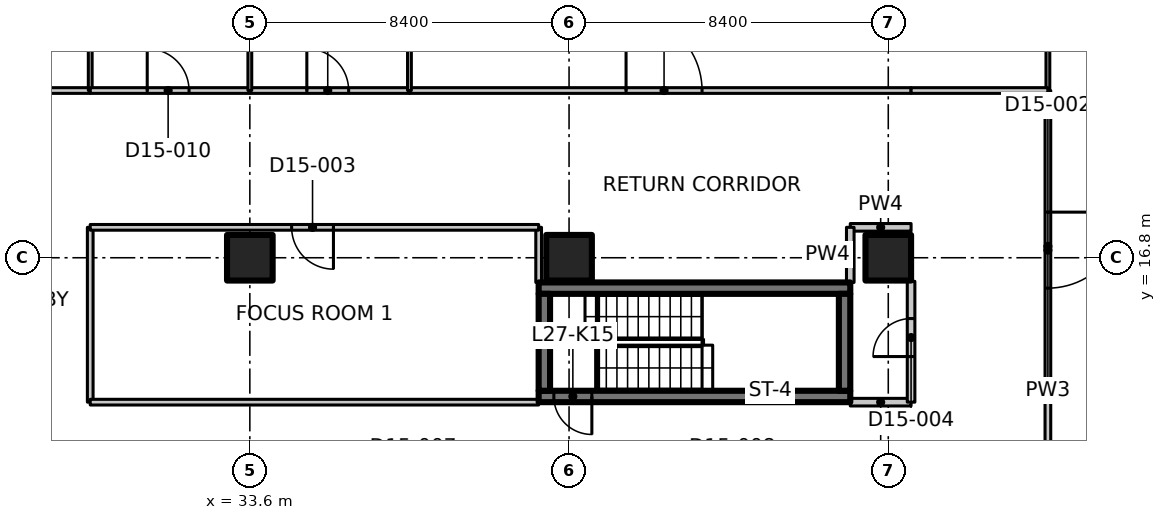
"""IFC4 building model, lengths in metres.
Left out: names, types, materials, properties, quantities, classifications, styles, units other than length and angle.
Written with IfcOpenShell. Run it as: python <this file> out.ifc"""

import sys

from ifc_helpers import new_model, si_unit, direction, frame, frame_2d, origin, origin_2d, place, context, subcontext, project, spatial, polyline, rectangle, outline, extrude, element, fill, save


model = new_model("IFC4")
c1 = context("Model", 3, precision=1e-05, world=origin(), true_north=direction((0.0, 1.0)))
c2 = subcontext(c1, "Body", "Model", "MODEL_VIEW")
j1 = project(units=[si_unit("LENGTHUNIT", "METRE"), si_unit("PLANEANGLEUNIT", "RADIAN")], contexts=[c1])
p1 = place(None, origin())
s1 = spatial("IfcSite", under=j1, at=p1, CompositionType="ELEMENT")
p2 = place(p1, origin())
s2 = spatial("IfcBuilding", under=s1, at=p2, CompositionType="ELEMENT")
p3 = place(p2, frame((0.0, 0.0, 113.3)))
s3 = spatial("IfcBuildingStorey", under=s2, at=p3, CompositionType="ELEMENT", Elevation=113.3)
for number, where, z_axis, x_axis in (
    (1, (33.6, 16.8, 0.0), (0.0, 0.0, 1.0), (1.0, 0.0, 0.0)),
    (2, (42.0, 16.8, 0.0), (0.0, 0.0, 1.0), (1.0, 0.0, 0.0)),
    (3, (50.4, 16.8, 0.0), (0.0, 0.0, 1.0), (1.0, 0.0, 0.0)),
):
    element("IfcColumn", number, at=place(p3, frame(where, z_axis=z_axis, x_axis=x_axis)), inside=s3, PredefinedType="COLUMN", context=c2, shape_type="SweptSolid", body=[
        extrude(rectangle(XDim=1.2, YDim=1.2, at=origin_2d()), origin(), (0.0, 0.0, 1.0), 3.35),
    ])
p4 = place(p3, frame((49.4, 13.15, 0.0), z_axis=(0.0, 0.0, 1.0), x_axis=(-1.0, 0.0, 0.0)))
e4 = element("IfcWall", 4, at=p4, inside=s3, PredefinedType="SHEAR", context=c2, shape_type="SweptSolid", body=[
    extrude(rectangle(XDim=8.2, YDim=0.3, at=frame_2d((4.1, 0.0))), origin(), (0.0, 0.0, 1.0), 3.35),
])
p5 = place(p4, frame((6.8, 0.0, 0.0)))
e5 = element("IfcOpeningElement", 5, at=p5, cuts=e4, PredefinedType="OPENING", context=c2, shape_type="SweptSolid", body=[
    extrude(rectangle(XDim=1.0, YDim=2.1, at=frame_2d((0.5, 1.05))), frame((0.0, 0.16, 0.0), z_axis=(0.0, -1.0, 0.0), x_axis=(1.0, 0.0, 0.0)), (0.0, 0.0, 1.0), 0.32),
])
p6 = place(p3, frame((41.2, 16.0, 0.0), z_axis=(0.0, 0.0, 1.0), x_axis=(1.0, 0.0, 0.0)))
e6 = element("IfcWall", 6, at=p6, inside=s3, PredefinedType="SHEAR", context=c2, shape_type="SweptSolid", body=[
    extrude(rectangle(XDim=8.2, YDim=0.3, at=frame_2d((4.1, 0.0))), origin(), (0.0, 0.0, 1.0), 3.35),
])
for number, where, z_axis, x_axis in (
    (7, (41.35, 13.3, 0.0), (0.0, 0.0, 1.0), (0.0, 1.0, 0.0)),
    (8, (49.25, 13.3, 0.0), (0.0, 0.0, 1.0), (0.0, 1.0, 0.0)),
):
    element("IfcWall", number, at=place(p3, frame(where, z_axis=z_axis, x_axis=x_axis)), inside=s3, PredefinedType="SHEAR", context=c2, shape_type="SweptSolid", body=[
        extrude(rectangle(XDim=2.55, YDim=0.3, at=frame_2d((1.275, 0.0))), origin(), (0.0, 0.0, 1.0), 3.35),
    ])
p7 = place(p3, frame((25.2, 21.2, 0.0), z_axis=(0.0, 0.0, 1.0), x_axis=(1.0, 0.0, 0.0)))
e9 = element("IfcWall", 9, at=p7, inside=s3, PredefinedType="PARTITIONING", context=c2, shape_type="SweptSolid", body=[
    extrude(rectangle(XDim=4.2, YDim=0.15, at=frame_2d((2.1, 0.0))), origin(), (0.0, 0.0, 1.0), 3.33),
])
p8 = place(p3, frame((29.4, 17.6, 0.0), z_axis=(0.0, 0.0, 1.0), x_axis=(0.0, -1.0, 0.0)))
e10 = element("IfcWall", 10, at=p8, inside=s3, PredefinedType="PARTITIONING", context=c2, shape_type="SweptSolid", body=[
    extrude(rectangle(XDim=4.6, YDim=0.15, at=frame_2d((2.3, 0.0))), origin(), (0.0, 0.0, 1.0), 3.33),
])
p9 = place(p3, frame((29.4, 27.511, 0.0), z_axis=(0.0, 0.0, 1.0), x_axis=(0.0, -1.0, 0.0)))
e11 = element("IfcWall", 11, at=p9, inside=s3, PredefinedType="PARTITIONING", context=c2, shape_type="SweptSolid", body=[
    extrude(outline(polyline([(0.0, 0.0), (6.311, 0.0), (6.311, 3.33), (2.761, 3.33), (2.759, 2.98), (1.863, 2.98), (1.861, 3.33), (0.236, 3.33), (0.0, 3.33), (0.0, 0.0)])), frame((0.0, 0.05, 0.0), z_axis=(0.0, -1.0, 0.0), x_axis=(1.0, 0.0, 0.0)), (0.0, 0.0, 1.0), 0.1),
])
p10 = place(p3, frame((54.6, 13.0, 0.0), z_axis=(0.0, 0.0, 1.0), x_axis=(0.0, -1.0, 0.0)))
e12 = element("IfcWall", 12, at=p10, inside=s3, PredefinedType="PARTITIONING", context=c2, shape_type="SweptSolid", body=[
    extrude(rectangle(XDim=3.4, YDim=0.15, at=frame_2d((1.7, 0.0))), origin(), (0.0, 0.0, 1.0), 3.33),
])
p11 = place(p3, frame((29.4, 13.0, 0.0), z_axis=(0.0, 0.0, 1.0), x_axis=(1.0, 0.0, 0.0)))
e13 = element("IfcWall", 13, at=p11, inside=s3, PredefinedType="PARTITIONING", context=c2, shape_type="SweptSolid", body=[
    extrude(rectangle(XDim=11.8, YDim=0.15, at=frame_2d((5.9, 0.0))), origin(), (0.0, 0.0, 1.0), 3.33),
])
p12 = place(p3, frame((49.4, 13.0, 0.0), z_axis=(0.0, 0.0, 1.0), x_axis=(1.0, 0.0, 0.0)))
e14 = element("IfcWall", 14, at=p12, inside=s3, PredefinedType="PARTITIONING", context=c2, shape_type="SweptSolid", body=[
    extrude(rectangle(XDim=1.6, YDim=0.2, at=frame_2d((0.8, 0.0))), origin(), (0.0, 0.0, 1.0), 3.33),
])
p13 = place(p3, frame((54.6, 21.2, 0.0), z_axis=(0.0, 0.0, 1.0), x_axis=(0.0, -1.0, 0.0)))
e15 = element("IfcWall", 15, at=p13, inside=s3, PredefinedType="PARTITIONING", context=c2, shape_type="SweptSolid", body=[
    extrude(rectangle(XDim=8.2, YDim=0.15, at=frame_2d((4.1, 0.0))), origin(), (0.0, 0.0, 1.0), 3.33),
])
p14 = place(p13, frame((3.2, 0.0, 0.0)))
e16 = element("IfcOpeningElement", 16, at=p14, cuts=e15, PredefinedType="OPENING", context=c2, shape_type="SweptSolid", body=[
    extrude(rectangle(XDim=2.0, YDim=2.4, at=frame_2d((1.0, 1.2))), frame((0.0, 0.085, 0.0), z_axis=(0.0, -1.0, 0.0), x_axis=(1.0, 0.0, 0.0)), (0.0, 0.0, 1.0), 0.17),
])
p15 = place(p3, frame((54.6, 21.2, 0.0), z_axis=(0.0, 0.0, 1.0), x_axis=(0.0, 1.0, 0.0)))
e17 = element("IfcWall", 17, at=p15, inside=s3, PredefinedType="PARTITIONING", context=c2, shape_type="SweptSolid", body=[
    extrude(outline(polyline([(0.0, 0.0), (5.365, 0.0), (5.365, 3.33), (5.1, 3.33), (4.45, 3.33), (4.448, 2.98), (3.552, 2.98), (3.55, 3.33), (0.0, 3.33), (0.0, 0.0)])), frame((0.0, 0.05, 0.0), z_axis=(0.0, -1.0, 0.0), x_axis=(1.0, 0.0, 0.0)), (0.0, 0.0, 1.0), 0.1),
])
p16 = place(p3, frame((41.2, 16.15, 0.0), z_axis=(0.0, 0.0, 1.0), x_axis=(0.0, 1.0, 0.0)))
e18 = element("IfcWall", 18, at=p16, inside=s3, PredefinedType="PARTITIONING", context=c2, shape_type="SweptSolid", body=[
    extrude(rectangle(XDim=1.45, YDim=0.15, at=frame_2d((0.725, 0.0))), origin(), (0.0, 0.0, 1.0), 3.33),
])
p17 = place(p3, frame((41.2, 17.6, 0.0), z_axis=(0.0, 0.0, 1.0), x_axis=(-1.0, 0.0, 0.0)))
e19 = element("IfcWall", 19, at=p17, inside=s3, PredefinedType="PARTITIONING", context=c2, shape_type="SweptSolid", body=[
    extrude(rectangle(XDim=11.8, YDim=0.15, at=frame_2d((5.9, 0.0))), origin(), (0.0, 0.0, 1.0), 3.33),
])
p18 = place(p17, frame((5.4, 0.0, 0.0)))
e20 = element("IfcOpeningElement", 20, at=p18, cuts=e19, PredefinedType="OPENING", context=c2, shape_type="SweptSolid", body=[
    extrude(rectangle(XDim=1.1, YDim=2.1, at=frame_2d((0.55, 1.05))), frame((0.0, 0.085, 0.0), z_axis=(0.0, -1.0, 0.0), x_axis=(1.0, 0.0, 0.0)), (0.0, 0.0, 1.0), 0.17),
])
p19 = place(p3, frame((51.0, 17.6, 0.0), z_axis=(0.0, 0.0, 1.0), x_axis=(-1.0, 0.0, 0.0)))
e21 = element("IfcWall", 21, at=p19, inside=s3, PredefinedType="PARTITIONING", context=c2, shape_type="SweptSolid", body=[
    extrude(rectangle(XDim=1.6, YDim=0.2, at=frame_2d((0.8, 0.0))), origin(), (0.0, 0.0, 1.0), 3.33),
])
p20 = place(p3, frame((49.4, 17.6, 0.0), z_axis=(0.0, 0.0, 1.0), x_axis=(0.0, -1.0, 0.0)))
e22 = element("IfcWall", 22, at=p20, inside=s3, PredefinedType="PARTITIONING", context=c2, shape_type="SweptSolid", body=[
    extrude(rectangle(XDim=1.45, YDim=0.2, at=frame_2d((0.725, 0.0))), origin(), (0.0, 0.0, 1.0), 3.33),
])
p21 = place(p3, frame((29.4, 21.2, 0.0), z_axis=(0.0, 0.0, 1.0), x_axis=(1.0, 0.0, 0.0)))
e23 = element("IfcWall", 23, at=p21, inside=s3, PredefinedType="PARTITIONING", context=c2, shape_type="SweptSolid", body=[
    extrude(rectangle(XDim=4.2, YDim=0.15, at=frame_2d((2.1, 0.0))), origin(), (0.0, 0.0, 1.0), 3.33),
])
p22 = place(p21, frame((1.5, 0.0, 0.0)))
e24 = element("IfcOpeningElement", 24, at=p22, cuts=e23, PredefinedType="OPENING", context=c2, shape_type="SweptSolid", body=[
    extrude(rectangle(XDim=1.1, YDim=2.1, at=frame_2d((0.55, 1.05))), frame((0.0, 0.085, 0.0), z_axis=(0.0, -1.0, 0.0), x_axis=(1.0, 0.0, 0.0)), (0.0, 0.0, 1.0), 0.17),
])
p23 = place(p3, frame((33.6, 21.2, 0.0), z_axis=(0.0, 0.0, 1.0), x_axis=(1.0, 0.0, 0.0)))
e25 = element("IfcWall", 25, at=p23, inside=s3, PredefinedType="PARTITIONING", context=c2, shape_type="SweptSolid", body=[
    extrude(rectangle(XDim=4.2, YDim=0.15, at=frame_2d((2.1, 0.0))), origin(), (0.0, 0.0, 1.0), 3.33),
])
p24 = place(p23, frame((1.5, 0.0, 0.0)))
e26 = element("IfcOpeningElement", 26, at=p24, cuts=e25, PredefinedType="OPENING", context=c2, shape_type="SweptSolid", body=[
    extrude(rectangle(XDim=1.1, YDim=2.1, at=frame_2d((0.55, 1.05))), frame((0.0, 0.085, 0.0), z_axis=(0.0, -1.0, 0.0), x_axis=(1.0, 0.0, 0.0)), (0.0, 0.0, 1.0), 0.17),
])
p25 = place(p3, frame((37.8, 21.2, 0.0), z_axis=(0.0, 0.0, 1.0), x_axis=(1.0, 0.0, 0.0)))
e27 = element("IfcWall", 27, at=p25, inside=s3, PredefinedType="PARTITIONING", context=c2, shape_type="SweptSolid", body=[
    extrude(rectangle(XDim=13.2, YDim=0.15, at=frame_2d((6.6, 0.0))), origin(), (0.0, 0.0, 1.0), 3.33),
])
p26 = place(p25, frame((5.7, 0.0, 0.0)))
e28 = element("IfcOpeningElement", 28, at=p26, cuts=e27, PredefinedType="OPENING", context=c2, shape_type="SweptSolid", body=[
    extrude(rectangle(XDim=2.0, YDim=2.4, at=frame_2d((1.0, 1.2))), frame((0.0, 0.085, 0.0), z_axis=(0.0, -1.0, 0.0), x_axis=(1.0, 0.0, 0.0)), (0.0, 0.0, 1.0), 0.17),
])
p27 = place(p3, frame((51.0, 13.0, 0.0), z_axis=(0.0, 0.0, 1.0), x_axis=(0.0, 1.0, 0.0)))
e29 = element("IfcWall", 29, at=p27, inside=s3, PredefinedType="PARTITIONING", context=c2, shape_type="SweptSolid", body=[
    extrude(rectangle(XDim=3.18, YDim=0.2, at=frame_2d((1.59, 0.0))), origin(), (0.0, 0.0, 1.0), 3.33),
])
p28 = place(p27, frame((1.2, 0.0, 0.0)))
e30 = element("IfcOpeningElement", 30, at=p28, cuts=e29, PredefinedType="OPENING", context=c2, shape_type="SweptSolid", body=[
    extrude(rectangle(XDim=1.0, YDim=2.1, at=frame_2d((0.5, 1.05))), frame((0.0, 0.11, 0.0), z_axis=(0.0, -1.0, 0.0), x_axis=(1.0, 0.0, 0.0)), (0.0, 0.0, 1.0), 0.22),
])
p29 = place(p3, frame((51.0, 21.2, 0.0), z_axis=(0.0, 0.0, 1.0), x_axis=(1.0, 0.0, 0.0)))
e31 = element("IfcWall", 31, at=p29, inside=s3, PredefinedType="PARTITIONING", context=c2, shape_type="SweptSolid", body=[
    extrude(rectangle(XDim=3.6, YDim=0.15, at=frame_2d((1.8, 0.0))), origin(), (0.0, 0.0, 1.0), 3.33),
])
p30 = place(p3, frame((33.6, 24.68, 0.0), z_axis=(0.0, 0.0, 1.0), x_axis=(0.0, -1.0, 0.0)))
e32 = element("IfcWall", 32, at=p30, inside=s3, PredefinedType="PARTITIONING", context=c2, shape_type="SweptSolid", body=[
    extrude(rectangle(XDim=3.48, YDim=0.1, at=frame_2d((1.74, 0.0))), origin(), (0.0, 0.0, 1.0), 3.33),
])
p31 = place(p3, frame((37.8, 30.526, 0.0), z_axis=(0.0, 0.0, 1.0), x_axis=(0.0, -1.0, 0.0)))
e33 = element("IfcWall", 33, at=p31, inside=s3, PredefinedType="PARTITIONING", context=c2, shape_type="SweptSolid", body=[
    extrude(outline(polyline([(0.0, 0.0), (9.326, 0.0), (9.326, 3.33), (5.776, 3.33), (5.774, 2.98), (4.878, 2.98), (4.876, 3.33), (0.283, 3.33), (0.0, 3.33), (0.0, 0.0)])), frame((0.0, 0.05, 0.0), z_axis=(0.0, -1.0, 0.0), x_axis=(1.0, 0.0, 0.0)), (0.0, 0.0, 1.0), 0.1),
])
p32 = place(p5, origin())
e34 = element("IfcDoor", 34, at=p32, inside=s3, OperationType="SINGLE_SWING_RIGHT", PredefinedType="DOOR", context=c2, shape_type="SweptSolid", body=[
    extrude(rectangle(XDim=1.0, YDim=2.1, at=frame_2d((0.5, 1.05))), frame((0.0, 0.025, 0.0), z_axis=(0.0, -1.0, 0.0), x_axis=(1.0, 0.0, 0.0)), (0.0, 0.0, 1.0), 0.05),
])
fill(e5, e34)
p33 = place(p14, origin())
e35 = element("IfcDoor", 35, at=p33, inside=s3, OperationType="DOUBLE_DOOR_SINGLE_SWING", PredefinedType="DOOR", context=c2, shape_type="SweptSolid", body=[
    extrude(rectangle(XDim=2.0, YDim=2.4, at=frame_2d((1.0, 1.2))), frame((0.0, 0.025, 0.0), z_axis=(0.0, -1.0, 0.0), x_axis=(1.0, 0.0, 0.0)), (0.0, 0.0, 1.0), 0.05),
])
fill(e16, e35)
p34 = place(p18, origin())
e36 = element("IfcDoor", 36, at=p34, inside=s3, OperationType="SINGLE_SWING_LEFT", PredefinedType="DOOR", context=c2, shape_type="SweptSolid", body=[
    extrude(rectangle(XDim=1.1, YDim=2.1, at=frame_2d((0.55, 1.05))), frame((0.0, 0.025, 0.0), z_axis=(0.0, -1.0, 0.0), x_axis=(1.0, 0.0, 0.0)), (0.0, 0.0, 1.0), 0.05),
])
fill(e20, e36)
p35 = place(p28, origin())
e37 = element("IfcDoor", 37, at=p35, inside=s3, OperationType="SINGLE_SWING_LEFT", PredefinedType="DOOR", context=c2, shape_type="SweptSolid", body=[
    extrude(rectangle(XDim=1.0, YDim=2.1, at=frame_2d((0.5, 1.05))), frame((0.0, 0.025, 0.0), z_axis=(0.0, -1.0, 0.0), x_axis=(1.0, 0.0, 0.0)), (0.0, 0.0, 1.0), 0.05),
])
fill(e30, e37)
p36 = place(p22, origin())
e38 = element("IfcDoor", 38, at=p36, inside=s3, OperationType="SINGLE_SWING_LEFT", PredefinedType="DOOR", context=c2, shape_type="SweptSolid", body=[
    extrude(rectangle(XDim=1.1, YDim=2.1, at=frame_2d((0.55, 1.05))), frame((0.0, 0.025, 0.0), z_axis=(0.0, -1.0, 0.0), x_axis=(1.0, 0.0, 0.0)), (0.0, 0.0, 1.0), 0.05),
])
fill(e24, e38)
p37 = place(p24, origin())
e39 = element("IfcDoor", 39, at=p37, inside=s3, OperationType="SINGLE_SWING_LEFT", PredefinedType="DOOR", context=c2, shape_type="SweptSolid", body=[
    extrude(rectangle(XDim=1.1, YDim=2.1, at=frame_2d((0.55, 1.05))), frame((0.0, 0.025, 0.0), z_axis=(0.0, -1.0, 0.0), x_axis=(1.0, 0.0, 0.0)), (0.0, 0.0, 1.0), 0.05),
])
fill(e26, e39)
p38 = place(p26, origin())
e40 = element("IfcDoor", 40, at=p38, inside=s3, OperationType="DOUBLE_DOOR_SINGLE_SWING", PredefinedType="DOOR", context=c2, shape_type="SweptSolid", body=[
    extrude(rectangle(XDim=2.0, YDim=2.4, at=frame_2d((1.0, 1.2))), frame((0.0, 0.025, 0.0), z_axis=(0.0, -1.0, 0.0), x_axis=(1.0, 0.0, 0.0)), (0.0, 0.0, 1.0), 0.05),
])
fill(e28, e40)
save(model, sys.argv[1])
